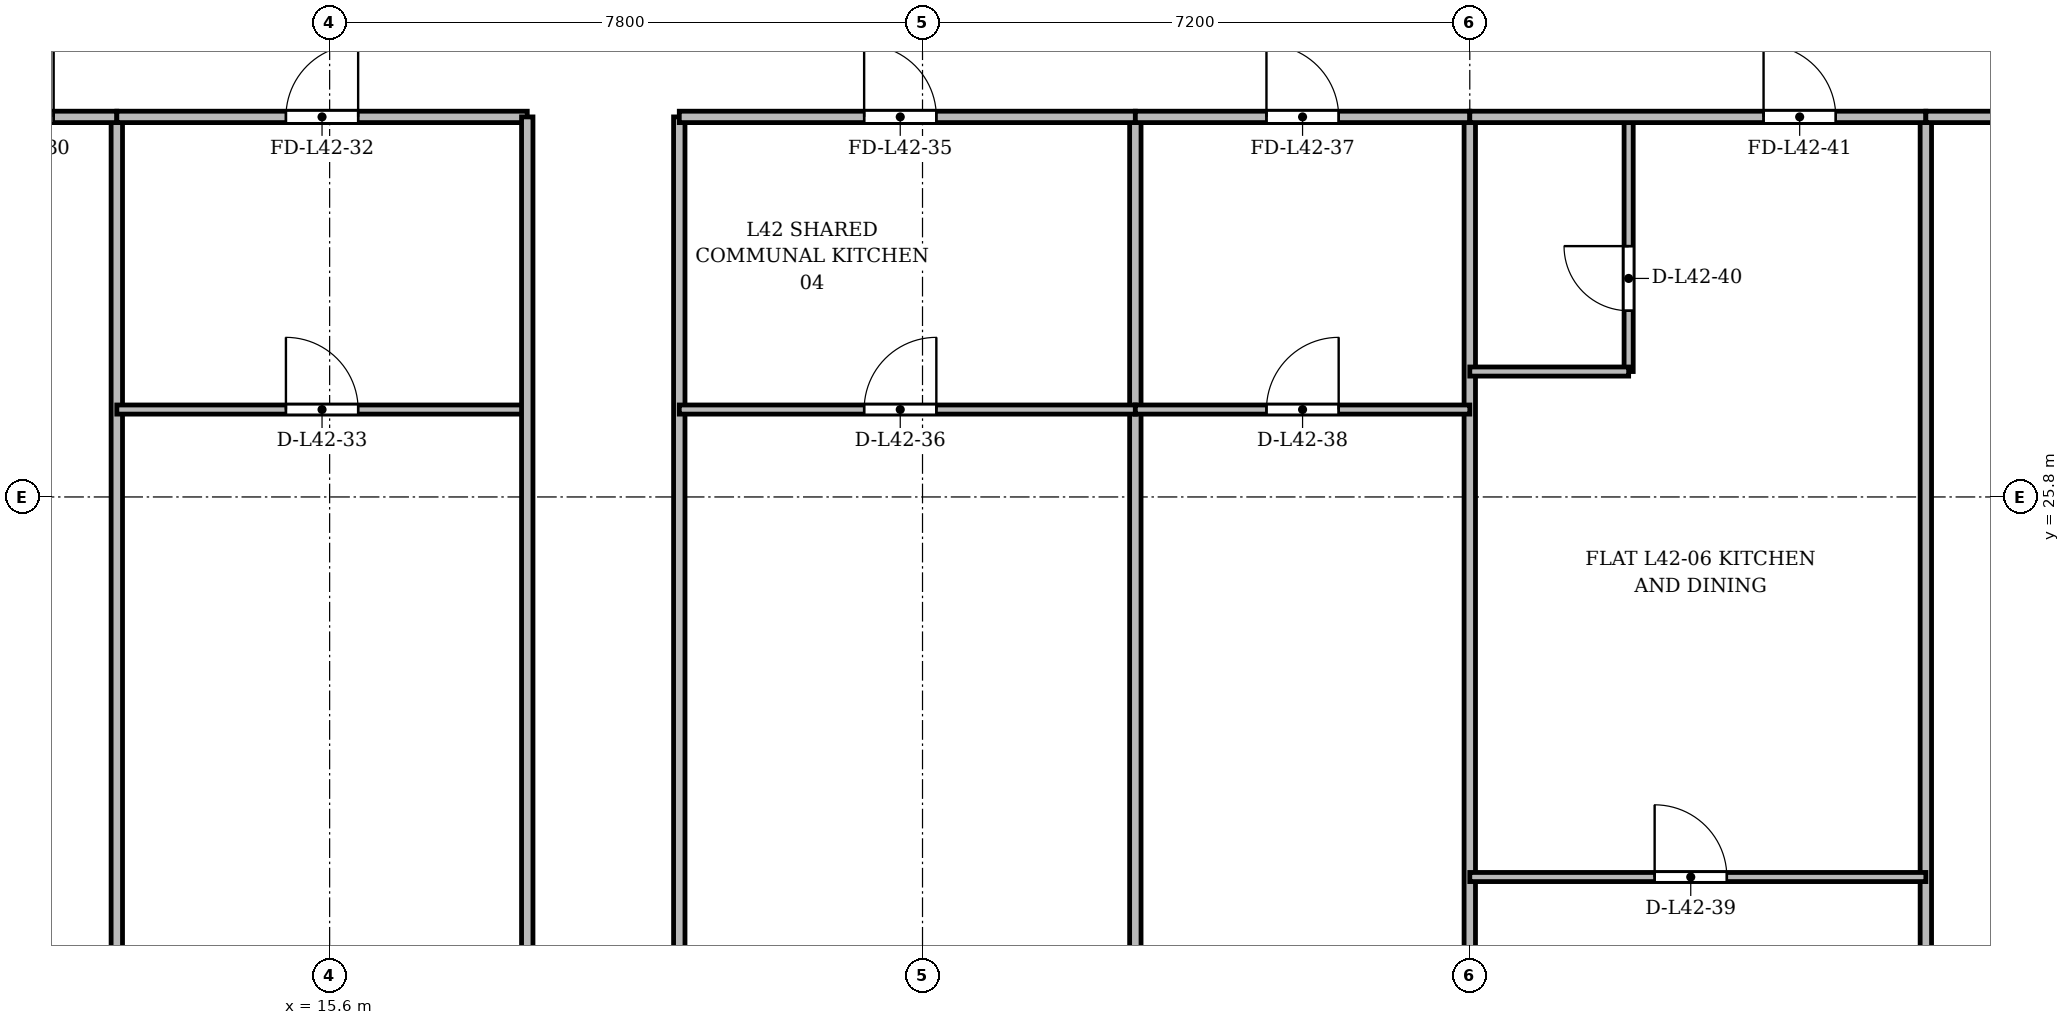
"""IFC4 building model, lengths in metres.
Left out: names, types, materials, properties, quantities, classifications, styles, units other than length and angle.
Written with IfcOpenShell. Run it as: python <this file> out.ifc"""

import sys

from ifc_helpers import new_model, si_unit, direction, frame, frame_2d, origin, place, context, subcontext, project, spatial, rectangle, extrude, source, transform, mapped, element, fill, save


model = new_model("IFC4")
c1 = context("Model", 3, precision=1e-05, world=origin(), true_north=direction((0.0, 1.0)))
c2 = subcontext(c1, "Body", "Model", "MODEL_VIEW")
j1 = project(units=[si_unit("LENGTHUNIT", "METRE"), si_unit("PLANEANGLEUNIT", "RADIAN")], contexts=[c1])
p1 = place(None, origin())
s1 = spatial("IfcSite", under=j1, at=p1, CompositionType="ELEMENT")
p2 = place(p1, origin())
s2 = spatial("IfcBuilding", under=s1, at=p2, CompositionType="ELEMENT")
p3 = place(p2, frame((0.0, 0.0, 160.9)))
s3 = spatial("IfcBuildingStorey", under=s2, at=p3, CompositionType="ELEMENT", Elevation=160.9)
for number, where, z_axis, x_axis in (
    (1, (12.8, 3.525, 0.0), (0.0, 0.0, 1.0), (0.0, 1.0, 0.0)),
    (2, (26.2, 3.525, 0.0), (0.0, 0.0, 1.0), (0.0, 1.0, 0.0)),
):
    element("IfcWall", number, at=place(p3, frame(where, z_axis=z_axis, x_axis=x_axis)), inside=s3, PredefinedType="PARTITIONING", context=c2, shape_type="SweptSolid", body=[
        extrude(rectangle(XDim=27.275, YDim=0.15, at=frame_2d((13.638, 0.0))), origin(), (0.0, 0.0, 1.0), 2.75),
    ])
p4 = place(p3, frame((30.6, 3.525, 0.0), z_axis=(0.0, 0.0, 1.0), x_axis=(0.0, 1.0, 0.0)))
e3 = element("IfcWall", 3, at=p4, inside=s3, PredefinedType="PARTITIONING", context=c2, shape_type="SweptSolid", body=[
    extrude(rectangle(XDim=27.275, YDim=0.15, at=frame_2d((13.638, 0.0))), origin(), (0.0, 0.0, 1.0), 2.85),
])
p5 = place(p3, frame((36.6, 3.525, 0.0), z_axis=(0.0, 0.0, 1.0), x_axis=(0.0, 1.0, 0.0)))
e4 = element("IfcWall", 4, at=p5, inside=s3, PredefinedType="PARTITIONING", context=c2, shape_type="SweptSolid", body=[
    extrude(rectangle(XDim=27.275, YDim=0.15, at=frame_2d((13.638, 0.0))), origin(), (0.0, 0.0, 1.0), 2.75),
])
p6 = place(p3, frame((8.025, 30.8, 0.0), z_axis=(0.0, 0.0, 1.0), x_axis=(1.0, 0.0, 0.0)))
e5 = element("IfcWall", 5, at=p6, inside=s3, PredefinedType="PARTITIONING", context=c2, shape_type="SweptSolid", body=[
    extrude(rectangle(XDim=4.775, YDim=0.15, at=frame_2d((2.388, 0.0))), origin(), (0.0, 0.0, 1.0), 2.85),
])
p7 = place(p6, frame((2.994, 0.0, 0.0)))
e6 = element("IfcOpeningElement", 6, at=p7, cuts=e5, PredefinedType="OPENING", context=c2, shape_type="SweptSolid", body=[
    extrude(rectangle(XDim=0.95, YDim=2.15, at=frame_2d((0.475, 1.075))), frame((0.0, 0.085, 0.0), z_axis=(0.0, -1.0, 0.0), x_axis=(1.0, 0.0, 0.0)), (0.0, 0.0, 1.0), 0.17),
])
p8 = place(p3, frame((12.8, 30.8, 0.0), z_axis=(0.0, 0.0, 1.0), x_axis=(1.0, 0.0, 0.0)))
e7 = element("IfcWall", 7, at=p8, inside=s3, PredefinedType="PARTITIONING", context=c2, shape_type="SweptSolid", body=[
    extrude(rectangle(XDim=5.4, YDim=0.15, at=frame_2d((2.7, 0.0))), origin(), (0.0, 0.0, 1.0), 2.85),
])
p9 = place(p8, frame((2.225, 0.0, 0.0)))
e8 = element("IfcOpeningElement", 8, at=p9, cuts=e7, PredefinedType="OPENING", context=c2, shape_type="SweptSolid", body=[
    extrude(rectangle(XDim=0.95, YDim=2.15, at=frame_2d((0.475, 1.075))), frame((0.0, 0.085, 0.0), z_axis=(0.0, -1.0, 0.0), x_axis=(1.0, 0.0, 0.0)), (0.0, 0.0, 1.0), 0.17),
])
p10 = place(p3, frame((12.8, 26.95, 0.0), z_axis=(0.0, 0.0, 1.0), x_axis=(1.0, 0.0, 0.0)))
e9 = element("IfcWall", 9, at=p10, inside=s3, PredefinedType="PARTITIONING", context=c2, shape_type="SweptSolid", body=[
    extrude(rectangle(XDim=5.4, YDim=0.12, at=frame_2d((2.7, 0.0))), origin(), (0.0, 0.0, 1.0), 2.85),
])
p11 = place(p10, frame((2.225, 0.0, 0.0)))
e10 = element("IfcOpeningElement", 10, at=p11, cuts=e9, PredefinedType="OPENING", context=c2, shape_type="SweptSolid", body=[
    extrude(rectangle(XDim=0.95, YDim=2.15, at=frame_2d((0.475, 1.075))), frame((0.0, 0.07, 0.0), z_axis=(0.0, -1.0, 0.0), x_axis=(1.0, 0.0, 0.0)), (0.0, 0.0, 1.0), 0.14),
])
for number, where, z_axis, x_axis in (
    (11, (18.2, 3.525, 0.0), (0.0, 0.0, 1.0), (0.0, 1.0, 0.0)),
    (12, (20.2, 3.525, 0.0), (0.0, 0.0, 1.0), (0.0, 1.0, 0.0)),
):
    element("IfcWall", number, at=place(p3, frame(where, z_axis=z_axis, x_axis=x_axis)), inside=s3, PredefinedType="PARTITIONING", context=c2, shape_type="SweptSolid", body=[
        extrude(rectangle(XDim=27.275, YDim=0.15, at=frame_2d((13.638, 0.0))), origin(), (0.0, 0.0, 1.0), 2.75),
    ])
p12 = place(p3, frame((20.2, 30.8, 0.0), z_axis=(0.0, 0.0, 1.0), x_axis=(1.0, 0.0, 0.0)))
e13 = element("IfcWall", 13, at=p12, inside=s3, PredefinedType="PARTITIONING", context=c2, shape_type="SweptSolid", body=[
    extrude(rectangle(XDim=6.0, YDim=0.15, at=frame_2d((3.0, 0.0))), origin(), (0.0, 0.0, 1.0), 2.85),
])
p13 = place(p12, frame((2.432, 0.0, 0.0)))
e14 = element("IfcOpeningElement", 14, at=p13, cuts=e13, PredefinedType="OPENING", context=c2, shape_type="SweptSolid", body=[
    extrude(rectangle(XDim=0.95, YDim=2.15, at=frame_2d((0.475, 1.075))), frame((0.0, 0.085, 0.0), z_axis=(0.0, -1.0, 0.0), x_axis=(1.0, 0.0, 0.0)), (0.0, 0.0, 1.0), 0.17),
])
p14 = place(p3, frame((20.2, 26.95, 0.0), z_axis=(0.0, 0.0, 1.0), x_axis=(1.0, 0.0, 0.0)))
e15 = element("IfcWall", 15, at=p14, inside=s3, PredefinedType="PARTITIONING", context=c2, shape_type="SweptSolid", body=[
    extrude(rectangle(XDim=6.0, YDim=0.12, at=frame_2d((3.0, 0.0))), origin(), (0.0, 0.0, 1.0), 2.85),
])
p15 = place(p14, frame((2.432, 0.0, 0.0)))
e16 = element("IfcOpeningElement", 16, at=p15, cuts=e15, PredefinedType="OPENING", context=c2, shape_type="SweptSolid", body=[
    extrude(rectangle(XDim=0.95, YDim=2.15, at=frame_2d((0.475, 1.075))), frame((0.0, 0.07, 0.0), z_axis=(0.0, -1.0, 0.0), x_axis=(1.0, 0.0, 0.0)), (0.0, 0.0, 1.0), 0.14),
])
p16 = place(p3, frame((26.2, 30.8, 0.0), z_axis=(0.0, 0.0, 1.0), x_axis=(1.0, 0.0, 0.0)))
e17 = element("IfcWall", 17, at=p16, inside=s3, PredefinedType="PARTITIONING", context=c2, shape_type="SweptSolid", body=[
    extrude(rectangle(XDim=4.4, YDim=0.15, at=frame_2d((2.2, 0.0))), origin(), (0.0, 0.0, 1.0), 2.85),
])
p17 = place(p16, frame((1.725, 0.0, 0.0)))
e18 = element("IfcOpeningElement", 18, at=p17, cuts=e17, PredefinedType="OPENING", context=c2, shape_type="SweptSolid", body=[
    extrude(rectangle(XDim=0.95, YDim=2.15, at=frame_2d((0.475, 1.075))), frame((0.0, 0.085, 0.0), z_axis=(0.0, -1.0, 0.0), x_axis=(1.0, 0.0, 0.0)), (0.0, 0.0, 1.0), 0.17),
])
p18 = place(p3, frame((26.2, 26.95, 0.0), z_axis=(0.0, 0.0, 1.0), x_axis=(1.0, 0.0, 0.0)))
e19 = element("IfcWall", 19, at=p18, inside=s3, PredefinedType="PARTITIONING", context=c2, shape_type="SweptSolid", body=[
    extrude(rectangle(XDim=4.4, YDim=0.12, at=frame_2d((2.2, 0.0))), origin(), (0.0, 0.0, 1.0), 2.85),
])
p19 = place(p18, frame((1.725, 0.0, 0.0)))
e20 = element("IfcOpeningElement", 20, at=p19, cuts=e19, PredefinedType="OPENING", context=c2, shape_type="SweptSolid", body=[
    extrude(rectangle(XDim=0.95, YDim=2.15, at=frame_2d((0.475, 1.075))), frame((0.0, 0.07, 0.0), z_axis=(0.0, -1.0, 0.0), x_axis=(1.0, 0.0, 0.0)), (0.0, 0.0, 1.0), 0.14),
])
p20 = place(p3, frame((30.6, 20.8, 0.0), z_axis=(0.0, 0.0, 1.0), x_axis=(1.0, 0.0, 0.0)))
e21 = element("IfcWall", 21, at=p20, inside=s3, PredefinedType="PARTITIONING", context=c2, shape_type="SweptSolid", body=[
    extrude(rectangle(XDim=6.0, YDim=0.12, at=frame_2d((3.0, 0.0))), origin(), (0.0, 0.0, 1.0), 2.85),
])
p21 = place(p20, frame((2.432, 0.0, 0.0)))
e22 = element("IfcOpeningElement", 22, at=p21, cuts=e21, PredefinedType="OPENING", context=c2, shape_type="SweptSolid", body=[
    extrude(rectangle(XDim=0.95, YDim=2.15, at=frame_2d((0.475, 1.075))), frame((0.0, 0.07, 0.0), z_axis=(0.0, -1.0, 0.0), x_axis=(1.0, 0.0, 0.0)), (0.0, 0.0, 1.0), 0.14),
])
p22 = place(p3, frame((32.69, 27.45, 0.0), z_axis=(0.0, 0.0, 1.0), x_axis=(0.0, 1.0, 0.0)))
e23 = element("IfcWall", 23, at=p22, inside=s3, PredefinedType="PARTITIONING", context=c2, shape_type="SweptSolid", body=[
    extrude(rectangle(XDim=3.35, YDim=0.12, at=frame_2d((1.675, 0.0))), origin(), (0.0, 0.0, 1.0), 3.35),
])
p23 = place(p22, frame((0.8, 0.0, 0.0)))
e24 = element("IfcOpeningElement", 24, at=p23, cuts=e23, PredefinedType="OPENING", context=c2, shape_type="SweptSolid", body=[
    extrude(rectangle(XDim=0.85, YDim=2.1, at=frame_2d((0.425, 1.05))), frame((0.0, 0.07, 0.0), z_axis=(0.0, -1.0, 0.0), x_axis=(1.0, 0.0, 0.0)), (0.0, 0.0, 1.0), 0.14),
])
p24 = place(p3, frame((30.6, 27.45, 0.0), z_axis=(0.0, 0.0, 1.0), x_axis=(1.0, 0.0, 0.0)))
e25 = element("IfcWall", 25, at=p24, inside=s3, PredefinedType="PARTITIONING", context=c2, shape_type="SweptSolid", body=[
    extrude(rectangle(XDim=2.09, YDim=0.12, at=frame_2d((1.045, 0.0))), origin(), (0.0, 0.0, 1.0), 2.85),
])
p25 = place(p3, frame((30.6, 30.8, 0.0), z_axis=(0.0, 0.0, 1.0), x_axis=(1.0, 0.0, 0.0)))
e26 = element("IfcWall", 26, at=p25, inside=s3, PredefinedType="PARTITIONING", context=c2, shape_type="SweptSolid", body=[
    extrude(rectangle(XDim=6.0, YDim=0.15, at=frame_2d((3.0, 0.0))), origin(), (0.0, 0.0, 1.0), 2.85),
])
p26 = place(p25, frame((3.865, 0.0, 0.0)))
e27 = element("IfcOpeningElement", 27, at=p26, cuts=e26, PredefinedType="OPENING", context=c2, shape_type="SweptSolid", body=[
    extrude(rectangle(XDim=0.95, YDim=2.15, at=frame_2d((0.475, 1.075))), frame((0.0, 0.085, 0.0), z_axis=(0.0, -1.0, 0.0), x_axis=(1.0, 0.0, 0.0)), (0.0, 0.0, 1.0), 0.17),
])
p27 = place(p3, frame((36.6, 30.8, 0.0), z_axis=(0.0, 0.0, 1.0), x_axis=(1.0, 0.0, 0.0)))
e28 = element("IfcWall", 28, at=p27, inside=s3, PredefinedType="PARTITIONING", context=c2, shape_type="SweptSolid", body=[
    extrude(rectangle(XDim=7.2, YDim=0.15, at=frame_2d((3.6, 0.0))), origin(), (0.0, 0.0, 1.0), 2.85),
])
p28 = place(p27, frame((3.125, 0.0, 0.0)))
e29 = element("IfcOpeningElement", 29, at=p28, cuts=e28, PredefinedType="OPENING", context=c2, shape_type="SweptSolid", body=[
    extrude(rectangle(XDim=0.95, YDim=2.15, at=frame_2d((0.475, 1.075))), frame((0.0, 0.085, 0.0), z_axis=(0.0, -1.0, 0.0), x_axis=(1.0, 0.0, 0.0)), (0.0, 0.0, 1.0), 0.17),
])
m1 = source(origin(), c2, "Body", "SweptSolid", [
    extrude(rectangle(XDim=0.95, YDim=2.15, at=frame_2d((0.475, 1.075))), frame((0.0, 0.025, 0.0), z_axis=(0.0, -1.0, 0.0), x_axis=(1.0, 0.0, 0.0)), (0.0, 0.0, 1.0), 0.05),
])
p29 = place(p7, origin())
e30 = element("IfcDoor", 30, at=p29, inside=s3, OperationType="SINGLE_SWING_RIGHT", PredefinedType="DOOR", context=c2, shape_type="MappedRepresentation", body=[
    mapped(m1, transform((0.0, 0.0, 0.0), x_axis=(1.0, 0.0, 0.0), y_axis=(0.0, 1.0, 0.0), z_axis=(0.0, 0.0, 1.0), scale=1.0)),
])
fill(e6, e30)
p30 = place(p9, origin())
e31 = element("IfcDoor", 31, at=p30, inside=s3, OperationType="SINGLE_SWING_RIGHT", PredefinedType="DOOR", context=c2, shape_type="MappedRepresentation", body=[
    mapped(m1, transform((0.0, 0.0, 0.0), x_axis=(1.0, 0.0, 0.0), y_axis=(0.0, 1.0, 0.0), z_axis=(0.0, 0.0, 1.0), scale=1.0)),
])
fill(e8, e31)
p31 = place(p11, origin())
e32 = element("IfcDoor", 32, at=p31, inside=s3, OperationType="SINGLE_SWING_LEFT", PredefinedType="DOOR", context=c2, shape_type="MappedRepresentation", body=[
    mapped(m1, transform((0.0, 0.0, 0.0), x_axis=(1.0, 0.0, 0.0), y_axis=(0.0, 1.0, 0.0), z_axis=(0.0, 0.0, 1.0), scale=1.0)),
])
fill(e10, e32)
p32 = place(p13, origin())
e33 = element("IfcDoor", 33, at=p32, inside=s3, OperationType="SINGLE_SWING_LEFT", PredefinedType="DOOR", context=c2, shape_type="MappedRepresentation", body=[
    mapped(m1, transform((0.0, 0.0, 0.0), x_axis=(1.0, 0.0, 0.0), y_axis=(0.0, 1.0, 0.0), z_axis=(0.0, 0.0, 1.0), scale=1.0)),
])
fill(e14, e33)
p33 = place(p15, origin())
e34 = element("IfcDoor", 34, at=p33, inside=s3, OperationType="SINGLE_SWING_RIGHT", PredefinedType="DOOR", context=c2, shape_type="MappedRepresentation", body=[
    mapped(m1, transform((0.0, 0.0, 0.0), x_axis=(1.0, 0.0, 0.0), y_axis=(0.0, 1.0, 0.0), z_axis=(0.0, 0.0, 1.0), scale=1.0)),
])
fill(e16, e34)
p34 = place(p17, origin())
e35 = element("IfcDoor", 35, at=p34, inside=s3, OperationType="SINGLE_SWING_LEFT", PredefinedType="DOOR", context=c2, shape_type="MappedRepresentation", body=[
    mapped(m1, transform((0.0, 0.0, 0.0), x_axis=(1.0, 0.0, 0.0), y_axis=(0.0, 1.0, 0.0), z_axis=(0.0, 0.0, 1.0), scale=1.0)),
])
fill(e18, e35)
p35 = place(p19, origin())
e36 = element("IfcDoor", 36, at=p35, inside=s3, OperationType="SINGLE_SWING_RIGHT", PredefinedType="DOOR", context=c2, shape_type="MappedRepresentation", body=[
    mapped(m1, transform((0.0, 0.0, 0.0), x_axis=(1.0, 0.0, 0.0), y_axis=(0.0, 1.0, 0.0), z_axis=(0.0, 0.0, 1.0), scale=1.0)),
])
fill(e20, e36)
p36 = place(p21, origin())
e37 = element("IfcDoor", 37, at=p36, inside=s3, OperationType="SINGLE_SWING_LEFT", PredefinedType="DOOR", context=c2, shape_type="MappedRepresentation", body=[
    mapped(m1, transform((0.0, 0.0, 0.0), x_axis=(1.0, 0.0, 0.0), y_axis=(0.0, 1.0, 0.0), z_axis=(0.0, 0.0, 1.0), scale=1.0)),
])
fill(e22, e37)
m2 = source(origin(), c2, "Body", "SweptSolid", [
    extrude(rectangle(XDim=0.85, YDim=2.1, at=frame_2d((0.425, 1.05))), frame((0.0, 0.025, 0.0), z_axis=(0.0, -1.0, 0.0), x_axis=(1.0, 0.0, 0.0)), (0.0, 0.0, 1.0), 0.05),
])
p37 = place(p23, origin())
e38 = element("IfcDoor", 38, at=p37, inside=s3, OperationType="SINGLE_SWING_RIGHT", PredefinedType="DOOR", context=c2, shape_type="MappedRepresentation", body=[
    mapped(m2, transform((0.0, 0.0, 0.0), x_axis=(1.0, 0.0, 0.0), y_axis=(0.0, 1.0, 0.0), z_axis=(0.0, 0.0, 1.0), scale=1.0)),
])
fill(e24, e38)
p38 = place(p26, origin())
e39 = element("IfcDoor", 39, at=p38, inside=s3, OperationType="SINGLE_SWING_LEFT", PredefinedType="DOOR", context=c2, shape_type="MappedRepresentation", body=[
    mapped(m1, transform((0.0, 0.0, 0.0), x_axis=(1.0, 0.0, 0.0), y_axis=(0.0, 1.0, 0.0), z_axis=(0.0, 0.0, 1.0), scale=1.0)),
])
fill(e27, e39)
save(model, sys.argv[1])
